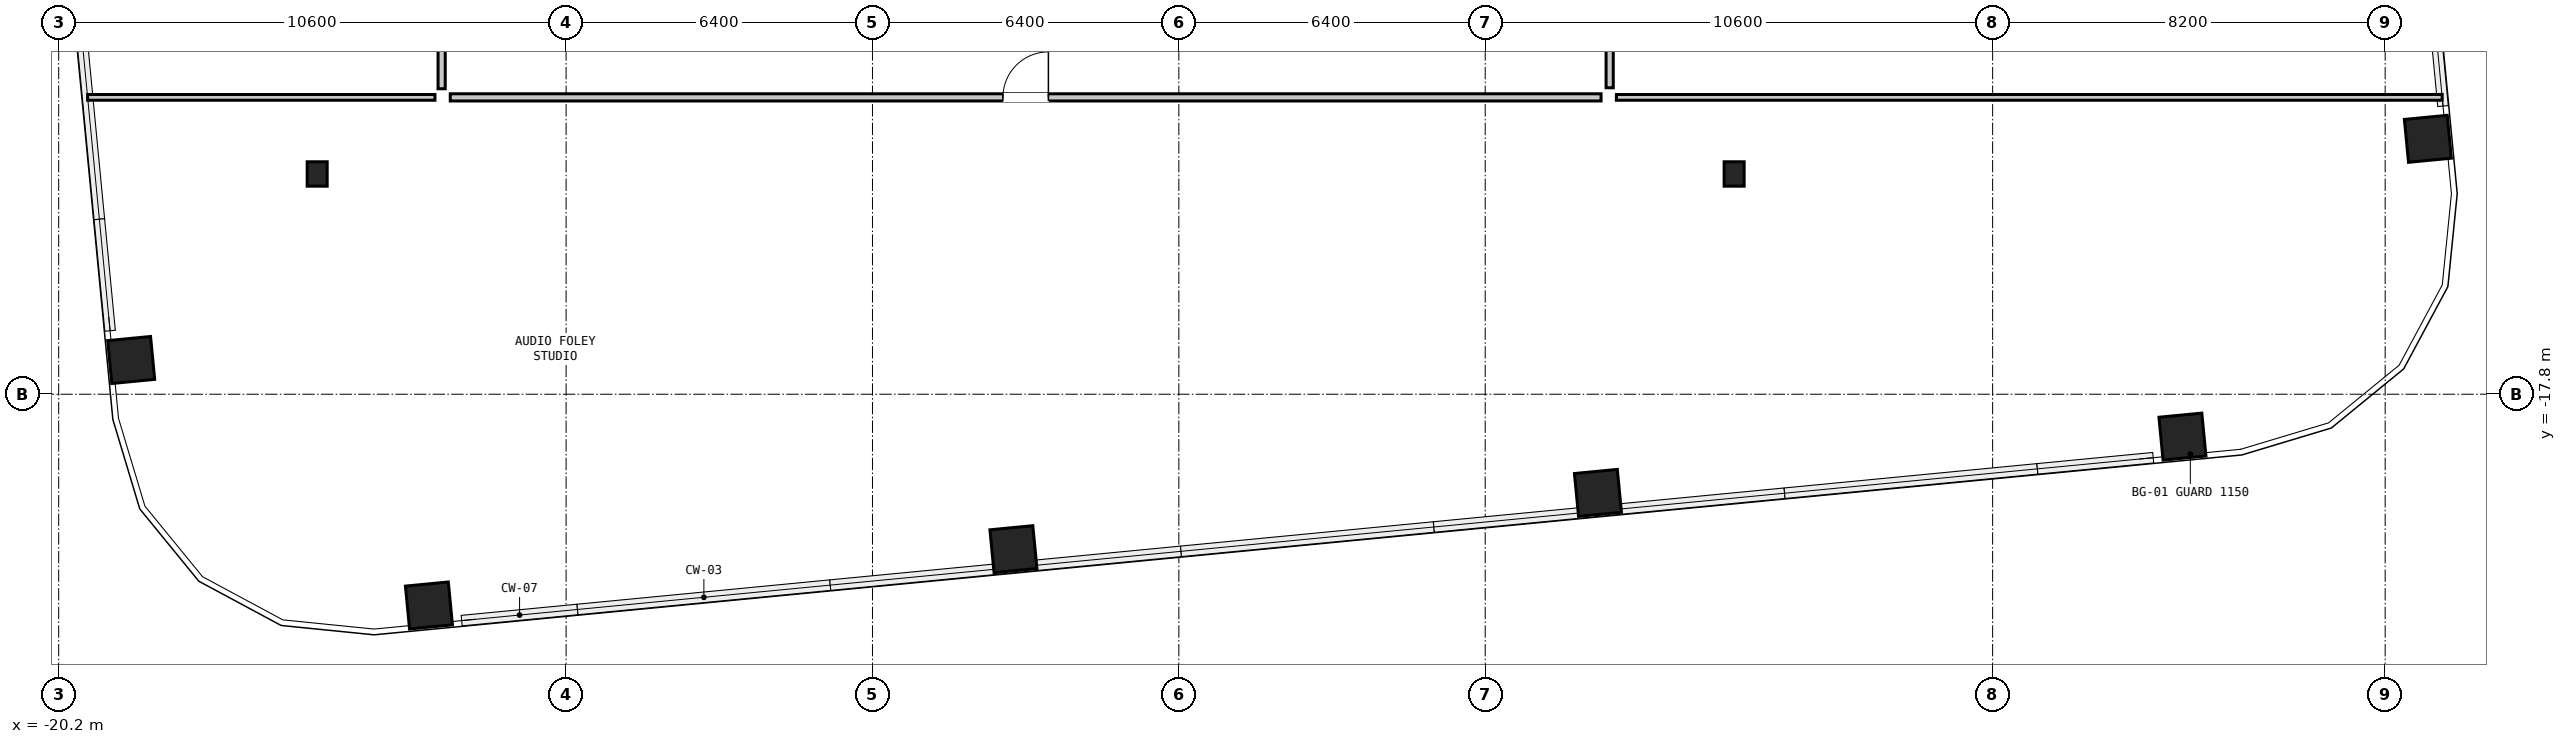
"""IFC4 building model, lengths in metres.
Left out: names, types, materials, properties, quantities, classifications, styles, units other than length and angle.
Written with IfcOpenShell. Run it as: python <this file> out.ifc"""

import sys

from ifc_helpers import new_model, si_unit, direction, frame, frame_2d, origin, origin_2d, place, context, subcontext, project, spatial, rectangle, hollow_rectangle, i_section, extrude, element, fill, save


model = new_model("IFC4")
c1 = context("Model", 3, precision=1e-05, world=origin(), true_north=direction((0.0, 1.0)))
c2 = subcontext(c1, "Body", "Model", "MODEL_VIEW")
j1 = project(units=[si_unit("LENGTHUNIT", "METRE"), si_unit("PLANEANGLEUNIT", "RADIAN")], contexts=[c1])
p1 = place(None, origin())
s1 = spatial("IfcSite", under=j1, at=p1, CompositionType="ELEMENT")
p2 = place(p1, origin())
s2 = spatial("IfcBuilding", under=s1, at=p2, CompositionType="ELEMENT")
p3 = place(p2, frame((0.0, 0.0, 72.5)))
s3 = spatial("IfcBuildingStorey", under=s2, at=p3, CompositionType="ELEMENT", Elevation=72.5)
for number, where, z_axis, x_axis in (
    (1, (-12.465, -22.213, 0.0), (0.0, 0.0, 1.0), (0.995, 0.096, 0.0)),
    (2, (-0.255, -21.037, 0.0), (0.0, 0.0, 1.0), (0.995, 0.096, 0.0)),
    (3, (11.955, -19.861, 0.0), (0.0, 0.0, 1.0), (0.995, 0.096, 0.0)),
    (4, (24.165, -18.686, 0.0), (0.0, 0.0, 1.0), (0.995, 0.096, 0.0)),
    (5, (29.292, -12.465, 0.0), (0.0, 0.0, 1.0), (-0.096, 0.995, 0.0)),
    (6, (-18.686, -17.085, 0.0), (0.0, 0.0, 1.0), (-0.096, 0.995, 0.0)),
):
    element("IfcColumn", number, at=place(p3, frame(where, z_axis=z_axis, x_axis=x_axis)), inside=s3, PredefinedType="COLUMN", context=c2, shape_type="SweptSolid", body=[
        extrude(hollow_rectangle(XDim=0.9, YDim=0.9, WallThickness=0.055, at=origin_2d()), origin(), (0.0, 0.0, 1.0), 3.05),
    ])
for number, where, z_axis, x_axis in (
    (7, (-14.8, -13.2, 0.0), (0.0, 0.0, 1.0), (1.0, 0.0, 0.0)),
    (8, (14.8, -13.2, 0.0), (0.0, 0.0, 1.0), (1.0, 0.0, 0.0)),
):
    element("IfcColumn", number, at=place(p3, frame(where, z_axis=z_axis, x_axis=x_axis)), inside=s3, PredefinedType="COLUMN", context=c2, shape_type="SweptSolid", body=[
        extrude(i_section(OverallWidth=0.418, OverallDepth=0.51, WebThickness=0.042, FlangeThickness=0.068, at=origin_2d()), origin(), (0.0, 0.0, 1.0), 3.05),
    ])
p4 = place(p3, frame((-19.595, -11.6, 0.0), z_axis=(0.0, 0.0, 1.0), x_axis=(1.0, 0.0, 0.0)))
e9 = element("IfcWall", 9, at=p4, inside=s3, PredefinedType="PARTITIONING", context=c2, shape_type="SweptSolid", body=[
    extrude(rectangle(XDim=7.255, YDim=0.12, at=frame_2d((3.628, 0.0))), origin(), (0.0, 0.0, 1.0), 2.274),
])
p5 = place(p3, frame((12.34, -11.6, 0.0), z_axis=(0.0, 0.0, 1.0), x_axis=(1.0, 0.0, 0.0)))
e10 = element("IfcWall", 10, at=p5, inside=s3, PredefinedType="PARTITIONING", context=c2, shape_type="SweptSolid", body=[
    extrude(rectangle(XDim=17.251, YDim=0.12, at=frame_2d((8.625, 0.0))), origin(), (0.0, 0.0, 1.0), 2.274),
])
p6 = place(p3, frame((-12.02, -11.6, 0.0), z_axis=(0.0, 0.0, 1.0), x_axis=(1.0, 0.0, 0.0)))
e11 = element("IfcWall", 11, at=p6, inside=s3, PredefinedType="PARTITIONING", context=c2, shape_type="SweptSolid", body=[
    extrude(rectangle(XDim=24.04, YDim=0.15, at=frame_2d((12.02, 0.0))), origin(), (0.0, 0.0, 1.0), 2.274),
])
p7 = place(p6, frame((11.545, 0.0, 0.0)))
e12 = element("IfcOpeningElement", 12, at=p7, cuts=e11, PredefinedType="OPENING", context=c2, shape_type="SweptSolid", body=[
    extrude(rectangle(XDim=0.95, YDim=2.1, at=frame_2d((0.475, 1.05))), frame((0.0, 0.087, 0.0), z_axis=(0.0, -1.0, 0.0), x_axis=(1.0, 0.0, 0.0)), (0.0, 0.0, 1.0), 0.174),
])
p8 = place(p3, frame((-12.2, -11.42, 0.0), z_axis=(0.0, 0.0, 1.0), x_axis=(0.0, 1.0, 0.0)))
e13 = element("IfcWall", 13, at=p8, inside=s3, PredefinedType="PARTITIONING", context=c2, shape_type="SweptSolid", body=[
    extrude(rectangle(XDim=24.04, YDim=0.15, at=frame_2d((12.02, 0.0))), origin(), (0.0, 0.0, 1.0), 2.83),
])
p9 = place(p8, frame((11.545, 0.0, 0.0)))
e14 = element("IfcOpeningElement", 14, at=p9, cuts=e13, PredefinedType="OPENING", context=c2, shape_type="SweptSolid", body=[
    extrude(rectangle(XDim=0.95, YDim=2.1, at=frame_2d((0.475, 1.05))), frame((0.0, 0.087, 0.0), z_axis=(0.0, -1.0, 0.0), x_axis=(1.0, 0.0, 0.0)), (0.0, 0.0, 1.0), 0.174),
])
p10 = place(p3, frame((12.2, -11.4, 0.0), z_axis=(0.0, 0.0, 1.0), x_axis=(0.0, 1.0, 0.0)))
e15 = element("IfcWall", 15, at=p10, inside=s3, PredefinedType="PARTITIONING", context=c2, shape_type="SweptSolid", body=[
    extrude(rectangle(XDim=8.84, YDim=0.15, at=frame_2d((4.42, 0.0))), origin(), (0.0, 0.0, 1.0), 2.83),
])
p11 = place(p10, frame((3.945, 0.0, 0.0)))
e16 = element("IfcOpeningElement", 16, at=p11, cuts=e15, PredefinedType="OPENING", context=c2, shape_type="SweptSolid", body=[
    extrude(rectangle(XDim=0.95, YDim=2.1, at=frame_2d((0.475, 1.05))), frame((0.0, 0.087, 0.0), z_axis=(0.0, -1.0, 0.0), x_axis=(1.0, 0.0, 0.0)), (0.0, 0.0, 1.0), 0.174),
])
p12 = place(p7, origin())
e17 = element("IfcDoor", 17, at=p12, inside=s3, OperationType="SINGLE_SWING_RIGHT", PredefinedType="DOOR", context=c2, shape_type="SweptSolid", body=[
    extrude(rectangle(XDim=0.95, YDim=2.1, at=frame_2d((0.475, 1.05))), frame((0.0, 0.025, 0.0), z_axis=(0.0, -1.0, 0.0), x_axis=(1.0, 0.0, 0.0)), (0.0, 0.0, 1.0), 0.05),
])
fill(e12, e17)
save(model, sys.argv[1])
